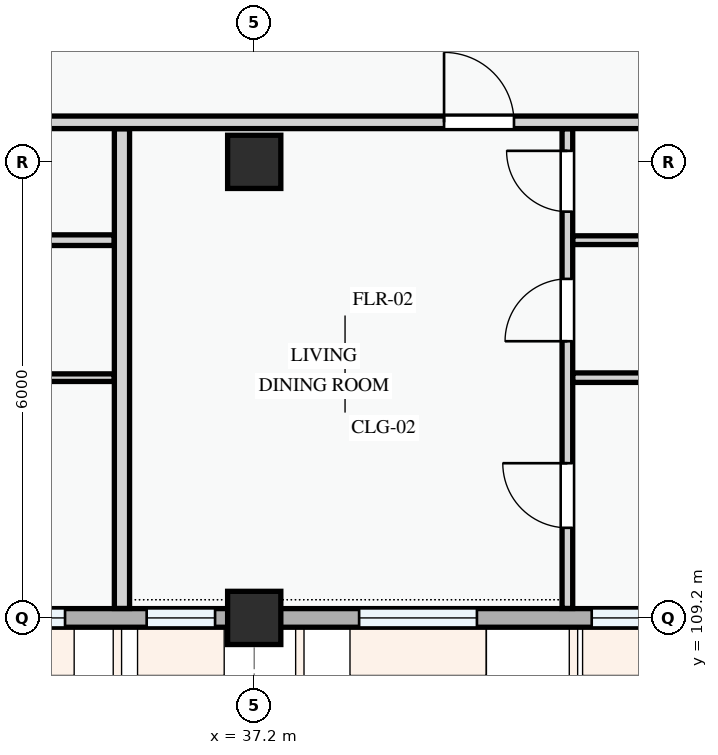
"""IFC4 building model, lengths in metres.
Left out: names, types, materials, properties, quantities, classifications, styles, units other than length and angle.
Written with IfcOpenShell. Run it as: python <this file> out.ifc"""

import sys

from ifc_helpers import new_model, si_unit, direction, frame, frame_2d, origin, origin_2d, place, context, subcontext, project, spatial, rectangle, extrude, element, fill, save


model = new_model("IFC4")
c1 = context("Model", 3, precision=1e-05, world=origin(), true_north=direction((0.0, 1.0)))
c2 = subcontext(c1, "Body", "Model", "MODEL_VIEW")
j1 = project(units=[si_unit("LENGTHUNIT", "METRE"), si_unit("PLANEANGLEUNIT", "RADIAN")], contexts=[c1])
p1 = place(None, origin())
s1 = spatial("IfcSite", under=j1, at=p1, CompositionType="ELEMENT")
p2 = place(p1, origin())
s2 = spatial("IfcBuilding", under=s1, at=p2, CompositionType="ELEMENT")
p3 = place(p2, frame((0.0, 0.0, 8.1)))
s3 = spatial("IfcBuildingStorey", under=s2, at=p3, CompositionType="ELEMENT", Elevation=8.1)
for number, where, z_axis, x_axis in (
    (1, (37.2, 109.2, 0.0), (0.0, 0.0, 1.0), (1.0, 0.0, 0.0)),
    (2, (37.2, 115.2, 0.0), (0.0, 0.0, 1.0), (1.0, 0.0, 0.0)),
):
    element("IfcColumn", number, at=place(p3, frame(where, z_axis=z_axis, x_axis=x_axis)), inside=s3, PredefinedType="COLUMN", context=c2, shape_type="SweptSolid", body=[
        extrude(rectangle(XDim=0.7, YDim=0.7, at=origin_2d()), origin(), (0.0, 0.0, 1.0), 3.3),
    ])
p4 = place(p3, frame((28.8, 109.2, 0.0), z_axis=(0.0, 0.0, 1.0), x_axis=(1.0, 0.0, 0.0)))
e3 = element("IfcWall", 3, at=p4, inside=s3, PredefinedType="STANDARD", context=c2, shape_type="SweptSolid", body=[
    extrude(rectangle(XDim=8.4, YDim=0.245, at=frame_2d((4.2, 0.0))), origin(), (0.0, 0.0, 1.0), 2.375),
])
p5 = place(p4, frame((0.522, 0.0, 0.78)))
e4 = element("IfcOpeningElement", 4, at=p5, cuts=e3, PredefinedType="OPENING", context=c2, shape_type="SweptSolid", body=[
    extrude(rectangle(XDim=0.95, YDim=1.15, at=frame_2d((0.475, 0.575))), frame((0.0, 0.133, 0.0), z_axis=(0.0, -1.0, 0.0), x_axis=(1.0, 0.0, 0.0)), (0.0, 0.0, 1.0), 0.265),
])
p6 = place(p4, frame((2.264, 0.0, 0.78)))
e5 = element("IfcOpeningElement", 5, at=p6, cuts=e3, PredefinedType="OPENING", context=c2, shape_type="SweptSolid", body=[
    extrude(rectangle(XDim=1.58, YDim=1.48, at=frame_2d((0.79, 0.74))), frame((0.0, 0.133, 0.0), z_axis=(0.0, -1.0, 0.0), x_axis=(1.0, 0.0, 0.0)), (0.0, 0.0, 1.0), 0.265),
])
p7 = place(p4, frame((4.911, 0.0, 0.78)))
e6 = element("IfcOpeningElement", 6, at=p7, cuts=e3, PredefinedType="OPENING", context=c2, shape_type="SweptSolid", body=[
    extrude(rectangle(XDim=1.0, YDim=1.25, at=frame_2d((0.5, 0.625))), frame((0.0, 0.133, 0.0), z_axis=(0.0, -1.0, 0.0), x_axis=(1.0, 0.0, 0.0)), (0.0, 0.0, 1.0), 0.265),
])
p8 = place(p4, frame((6.985, 0.0, 0.78)))
e7 = element("IfcOpeningElement", 7, at=p8, cuts=e3, PredefinedType="OPENING", context=c2, shape_type="SweptSolid", body=[
    extrude(rectangle(XDim=0.9, YDim=1.2, at=frame_2d((0.45, 0.6))), frame((0.0, 0.133, 0.0), z_axis=(0.0, -1.0, 0.0), x_axis=(1.0, 0.0, 0.0)), (0.0, 0.0, 1.0), 0.265),
])
p9 = place(p3, frame((37.2, 109.2, 0.0), z_axis=(0.0, 0.0, 1.0), x_axis=(1.0, 0.0, 0.0)))
e8 = element("IfcWall", 8, at=p9, inside=s3, PredefinedType="STANDARD", context=c2, shape_type="SweptSolid", body=[
    extrude(rectangle(XDim=6.0, YDim=0.245, at=frame_2d((3.0, 0.0))), origin(), (0.0, 0.0, 1.0), 2.475),
])
p10 = place(p9, frame((1.38, 0.0, 0.78)))
e9 = element("IfcOpeningElement", 9, at=p10, cuts=e8, PredefinedType="OPENING", context=c2, shape_type="SweptSolid", body=[
    extrude(rectangle(XDim=1.55, YDim=1.4, at=frame_2d((0.775, 0.7))), frame((0.0, 0.133, 0.0), z_axis=(0.0, -1.0, 0.0), x_axis=(1.0, 0.0, 0.0)), (0.0, 0.0, 1.0), 0.265),
])
p11 = place(p9, frame((4.44, 0.0, 0.78)))
e10 = element("IfcOpeningElement", 10, at=p11, cuts=e8, PredefinedType="OPENING", context=c2, shape_type="SweptSolid", body=[
    extrude(rectangle(XDim=1.05, YDim=1.2, at=frame_2d((0.525, 0.6))), frame((0.0, 0.133, 0.0), z_axis=(0.0, -1.0, 0.0), x_axis=(1.0, 0.0, 0.0)), (0.0, 0.0, 1.0), 0.265),
])
p12 = place(p3, frame((30.665, 112.361, 0.0), z_axis=(0.0, 0.0, 1.0), x_axis=(1.0, 0.0, 0.0)))
e11 = element("IfcWall", 11, at=p12, inside=s3, PredefinedType="PARTITIONING", context=c2, shape_type="SweptSolid", body=[
    extrude(rectangle(XDim=4.693, YDim=0.1, at=frame_2d((2.347, 0.0))), origin(), (0.0, 0.0, 1.0), 3.0),
])
p13 = place(p3, frame((30.665, 114.17, 0.0), z_axis=(0.0, 0.0, 1.0), x_axis=(1.0, 0.0, 0.0)))
e12 = element("IfcWall", 12, at=p13, inside=s3, PredefinedType="PARTITIONING", context=c2, shape_type="SweptSolid", body=[
    extrude(rectangle(XDim=4.693, YDim=0.14, at=frame_2d((2.347, 0.0))), origin(), (0.0, 0.0, 1.0), 3.0),
])
p14 = place(p3, frame((41.32, 109.324, 0.0), z_axis=(0.0, 0.0, 1.0), x_axis=(0.0, 1.0, 0.0)))
e13 = element("IfcWall", 13, at=p14, inside=s3, PredefinedType="PARTITIONING", context=c2, shape_type="SweptSolid", body=[
    extrude(rectangle(XDim=6.311, YDim=0.14, at=frame_2d((3.156, 0.0))), origin(), (0.0, 0.0, 1.0), 3.0),
])
p15 = place(p14, frame((1.061, 0.0, 0.0)))
e14 = element("IfcOpeningElement", 14, at=p15, cuts=e13, PredefinedType="OPENING", context=c2, shape_type="SweptSolid", body=[
    extrude(rectangle(XDim=0.85, YDim=2.1, at=frame_2d((0.425, 1.05))), frame((0.0, 0.08, 0.0), z_axis=(0.0, -1.0, 0.0), x_axis=(1.0, 0.0, 0.0)), (0.0, 0.0, 1.0), 0.16),
])
p16 = place(p14, frame((3.516, 0.0, 0.0)))
e15 = element("IfcOpeningElement", 15, at=p16, cuts=e13, PredefinedType="OPENING", context=c2, shape_type="SweptSolid", body=[
    extrude(rectangle(XDim=0.82, YDim=2.08, at=frame_2d((0.41, 1.04))), frame((0.0, 0.08, 0.0), z_axis=(0.0, -1.0, 0.0), x_axis=(1.0, 0.0, 0.0)), (0.0, 0.0, 1.0), 0.16),
])
p17 = place(p14, frame((5.22, 0.0, 0.0)))
e16 = element("IfcOpeningElement", 16, at=p17, cuts=e13, PredefinedType="OPENING", context=c2, shape_type="SweptSolid", body=[
    extrude(rectangle(XDim=0.8, YDim=2.1, at=frame_2d((0.4, 1.05))), frame((0.0, 0.08, 0.0), z_axis=(0.0, -1.0, 0.0), x_axis=(1.0, 0.0, 0.0)), (0.0, 0.0, 1.0), 0.16),
])
p18 = place(p3, frame((41.392, 112.361, 0.0), z_axis=(0.0, 0.0, 1.0), x_axis=(1.0, 0.0, 0.0)))
e17 = element("IfcWall", 17, at=p18, inside=s3, PredefinedType="PARTITIONING", context=c2, shape_type="SweptSolid", body=[
    extrude(rectangle(XDim=5.693, YDim=0.125, at=frame_2d((2.847, 0.0))), origin(), (0.0, 0.0, 1.0), 3.0),
])
p19 = place(p3, frame((41.392, 114.17, 0.0), z_axis=(0.0, 0.0, 1.0), x_axis=(1.0, 0.0, 0.0)))
e18 = element("IfcWall", 18, at=p19, inside=s3, PredefinedType="PARTITIONING", context=c2, shape_type="SweptSolid", body=[
    extrude(rectangle(XDim=5.693, YDim=0.115, at=frame_2d((2.847, 0.0))), origin(), (0.0, 0.0, 1.0), 3.0),
])
p20 = place(p3, frame((35.46, 109.324, 0.0), z_axis=(0.0, 0.0, 1.0), x_axis=(0.0, 1.0, 0.0)))
e19 = element("IfcWall", 19, at=p20, inside=s3, PredefinedType="PARTITIONING", context=c2, shape_type="SweptSolid", body=[
    extrude(rectangle(XDim=6.311, YDim=0.2, at=frame_2d((3.156, 0.0))), origin(), (0.0, 0.0, 1.0), 3.0),
])
p21 = place(p3, frame((25.15, 115.72, 0.0), z_axis=(0.0, 0.0, 1.0), x_axis=(1.0, 0.0, 0.0)))
e20 = element("IfcWall", 20, at=p21, inside=s3, PredefinedType="PARTITIONING", context=c2, shape_type="SweptSolid", body=[
    extrude(rectangle(XDim=32.326, YDim=0.165, at=frame_2d((16.163, 0.0))), origin(), (0.0, 0.0, 1.0), 3.0),
])
p22 = place(p21, frame((0.25, 0.0, 0.0)))
e21 = element("IfcOpeningElement", 21, at=p22, cuts=e20, PredefinedType="OPENING", context=c2, shape_type="SweptSolid", body=[
    extrude(rectangle(XDim=0.92, YDim=2.1, at=frame_2d((0.46, 1.05))), frame((0.0, 0.093, 0.0), z_axis=(0.0, -1.0, 0.0), x_axis=(1.0, 0.0, 0.0)), (0.0, 0.0, 1.0), 0.185),
])
p23 = place(p21, frame((14.548, 0.0, 0.0)))
e22 = element("IfcOpeningElement", 22, at=p23, cuts=e20, PredefinedType="OPENING", context=c2, shape_type="SweptSolid", body=[
    extrude(rectangle(XDim=0.92, YDim=2.1, at=frame_2d((0.46, 1.05))), frame((0.0, 0.093, 0.0), z_axis=(0.0, -1.0, 0.0), x_axis=(1.0, 0.0, 0.0)), (0.0, 0.0, 1.0), 0.185),
])
p24 = place(p21, frame((22.28, 0.0, 0.0)))
e23 = element("IfcOpeningElement", 23, at=p24, cuts=e20, PredefinedType="OPENING", context=c2, shape_type="SweptSolid", body=[
    extrude(rectangle(XDim=0.92, YDim=2.1, at=frame_2d((0.46, 1.05))), frame((0.0, 0.093, 0.0), z_axis=(0.0, -1.0, 0.0), x_axis=(1.0, 0.0, 0.0)), (0.0, 0.0, 1.0), 0.185),
])
p25 = place(p7, origin())
e24 = element("IfcWindow", 24, at=p25, inside=s3, PartitioningType="SINGLE_PANEL", PredefinedType="WINDOW", context=c2, shape_type="SweptSolid", body=[
    extrude(rectangle(XDim=1.0, YDim=1.25, at=frame_2d((0.5, 0.625))), frame((0.0, 0.03, 0.0), z_axis=(0.0, -1.0, 0.0), x_axis=(1.0, 0.0, 0.0)), (0.0, 0.0, 1.0), 0.06),
])
fill(e6, e24)
p26 = place(p8, origin())
e25 = element("IfcWindow", 25, at=p26, inside=s3, PartitioningType="SINGLE_PANEL", PredefinedType="WINDOW", context=c2, shape_type="SweptSolid", body=[
    extrude(rectangle(XDim=0.9, YDim=1.2, at=frame_2d((0.45, 0.6))), frame((0.0, 0.03, 0.0), z_axis=(0.0, -1.0, 0.0), x_axis=(1.0, 0.0, 0.0)), (0.0, 0.0, 1.0), 0.06),
])
fill(e7, e25)
p27 = place(p10, origin())
e26 = element("IfcWindow", 26, at=p27, inside=s3, PartitioningType="SINGLE_PANEL", PredefinedType="WINDOW", context=c2, shape_type="SweptSolid", body=[
    extrude(rectangle(XDim=1.55, YDim=1.4, at=frame_2d((0.775, 0.7))), frame((0.0, 0.03, 0.0), z_axis=(0.0, -1.0, 0.0), x_axis=(1.0, 0.0, 0.0)), (0.0, 0.0, 1.0), 0.06),
])
fill(e9, e26)
p28 = place(p11, origin())
e27 = element("IfcWindow", 27, at=p28, inside=s3, PartitioningType="SINGLE_PANEL", PredefinedType="WINDOW", context=c2, shape_type="SweptSolid", body=[
    extrude(rectangle(XDim=1.05, YDim=1.2, at=frame_2d((0.525, 0.6))), frame((0.0, 0.03, 0.0), z_axis=(0.0, -1.0, 0.0), x_axis=(1.0, 0.0, 0.0)), (0.0, 0.0, 1.0), 0.06),
])
fill(e10, e27)
p29 = place(p15, origin())
e28 = element("IfcDoor", 28, at=p29, inside=s3, OperationType="SINGLE_SWING_RIGHT", PredefinedType="DOOR", context=c2, shape_type="SweptSolid", body=[
    extrude(rectangle(XDim=0.85, YDim=2.1, at=frame_2d((0.425, 1.05))), frame((0.0, 0.025, 0.0), z_axis=(0.0, -1.0, 0.0), x_axis=(1.0, 0.0, 0.0)), (0.0, 0.0, 1.0), 0.05),
])
fill(e14, e28)
p30 = place(p16, origin())
e29 = element("IfcDoor", 29, at=p30, inside=s3, OperationType="SINGLE_SWING_LEFT", PredefinedType="DOOR", context=c2, shape_type="SweptSolid", body=[
    extrude(rectangle(XDim=0.82, YDim=2.08, at=frame_2d((0.41, 1.04))), frame((0.0, 0.025, 0.0), z_axis=(0.0, -1.0, 0.0), x_axis=(1.0, 0.0, 0.0)), (0.0, 0.0, 1.0), 0.05),
])
fill(e15, e29)
p31 = place(p17, origin())
e30 = element("IfcDoor", 30, at=p31, inside=s3, OperationType="SINGLE_SWING_RIGHT", PredefinedType="DOOR", context=c2, shape_type="SweptSolid", body=[
    extrude(rectangle(XDim=0.8, YDim=2.1, at=frame_2d((0.4, 1.05))), frame((0.0, 0.025, 0.0), z_axis=(0.0, -1.0, 0.0), x_axis=(1.0, 0.0, 0.0)), (0.0, 0.0, 1.0), 0.05),
])
fill(e16, e30)
p32 = place(p23, origin())
e31 = element("IfcDoor", 31, at=p32, inside=s3, OperationType="SINGLE_SWING_LEFT", PredefinedType="DOOR", context=c2, shape_type="SweptSolid", body=[
    extrude(rectangle(XDim=0.92, YDim=2.1, at=frame_2d((0.46, 1.05))), frame((0.0, 0.025, 0.0), z_axis=(0.0, -1.0, 0.0), x_axis=(1.0, 0.0, 0.0)), (0.0, 0.0, 1.0), 0.05),
])
fill(e22, e31)
save(model, sys.argv[1])
